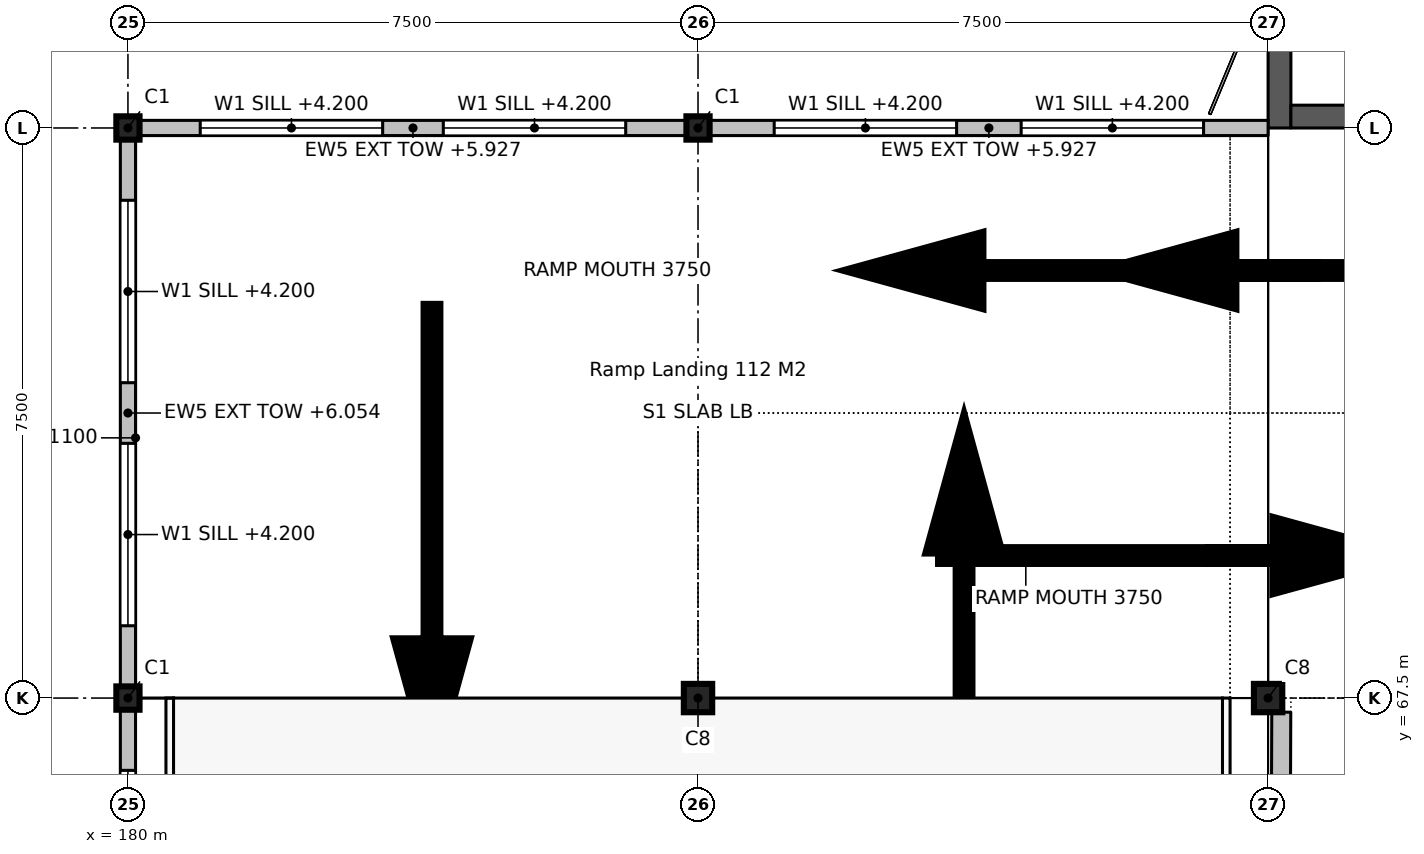
"""IFC4 building model, lengths in metres.
Left out: names, types, materials, properties, quantities, classifications, styles, units other than length and angle.
Written with IfcOpenShell. Run it as: python <this file> out.ifc"""

import sys

from ifc_helpers import new_model, si_unit, direction, frame, frame_2d, origin, origin_2d, place, context, subcontext, project, spatial, rectangle, i_section, extrude, element, fill, save


model = new_model("IFC4")
c1 = context("Model", 3, precision=1e-05, world=origin(), true_north=direction((0.0, 1.0)))
c2 = subcontext(c1, "Body", "Model", "MODEL_VIEW")
j1 = project(units=[si_unit("LENGTHUNIT", "METRE"), si_unit("PLANEANGLEUNIT", "RADIAN")], contexts=[c1])
p1 = place(None, origin())
s1 = spatial("IfcSite", under=j1, at=p1, CompositionType="ELEMENT")
p2 = place(p1, origin())
s2 = spatial("IfcBuilding", under=s1, at=p2, CompositionType="ELEMENT")
p3 = place(p2, frame((0.0, 0.0, 3.3)))
s3 = spatial("IfcBuildingStorey", under=s2, at=p3, CompositionType="ELEMENT", Elevation=3.3)
for number, where, z_axis, x_axis in (
    (1, (180.0, 67.5, 0.0), (0.0, 0.0, 1.0), (1.0, 0.0, 0.0)),
    (2, (180.0, 75.0, 0.0), (0.0, 0.0, 1.0), (1.0, 0.0, 0.0)),
):
    element("IfcColumn", number, at=place(p3, frame(where, z_axis=z_axis, x_axis=x_axis)), inside=s3, PredefinedType="COLUMN", context=c2, shape_type="SweptSolid", body=[
        extrude(i_section(OverallWidth=0.305, OverallDepth=0.307, WebThickness=0.01, FlangeThickness=0.015, FilletRadius=0.015, at=origin_2d()), origin(), (0.0, 0.0, 1.0), 3.3),
    ])
p4 = place(p3, frame((187.5, 67.5, 0.0), z_axis=(0.0, 0.0, 1.0), x_axis=(1.0, 0.0, 0.0)))
e3 = element("IfcColumn", 3, at=p4, inside=s3, PredefinedType="COLUMN", context=c2, shape_type="SweptSolid", body=[
    extrude(i_section(OverallWidth=0.373, OverallDepth=0.373, WebThickness=0.016, FlangeThickness=0.026, FilletRadius=0.015, at=origin_2d()), origin(), (0.0, 0.0, 1.0), 3.3),
])
p5 = place(p3, frame((187.5, 75.0, 0.0), z_axis=(0.0, 0.0, 1.0), x_axis=(1.0, 0.0, 0.0)))
e4 = element("IfcColumn", 4, at=p5, inside=s3, PredefinedType="COLUMN", context=c2, shape_type="SweptSolid", body=[
    extrude(i_section(OverallWidth=0.305, OverallDepth=0.307, WebThickness=0.01, FlangeThickness=0.015, FilletRadius=0.015, at=origin_2d()), origin(), (0.0, 0.0, 1.0), 3.3),
])
p6 = place(p3, frame((195.0, 67.5, 0.0), z_axis=(0.0, 0.0, 1.0), x_axis=(0.0, 1.0, 0.0)))
e5 = element("IfcColumn", 5, at=p6, inside=s3, PredefinedType="COLUMN", context=c2, shape_type="SweptSolid", body=[
    extrude(i_section(OverallWidth=0.373, OverallDepth=0.373, WebThickness=0.016, FlangeThickness=0.026, FilletRadius=0.015, at=origin_2d()), origin(), (0.0, 0.0, 1.0), 3.3),
])
p7 = place(p3, frame((195.173, 67.314, 0.0), z_axis=(0.0, 0.0, 1.0), x_axis=(-0.003612914829, -0.999993473402, 0.0)))
e6 = element("IfcWall", 6, at=p7, inside=s3, PredefinedType="SOLIDWALL", context=c2, shape_type="SweptSolid", body=[
    extrude(rectangle(XDim=7.163, YDim=0.25, at=frame_2d((3.582, 0.0))), origin(), (0.0, 0.0, 1.0), 1.1),
])
p8 = place(p3, frame((180.0, 60.154, 0.0), z_axis=(0.0, 0.0, 1.0), x_axis=(0.0, 1.0, 0.0)))
e7 = element("IfcWall", 7, at=p8, inside=s3, PredefinedType="SOLIDWALL", context=c2, shape_type="SweptSolid", body=[
    extrude(rectangle(XDim=7.193, YDim=0.2, at=frame_2d((3.596, 0.0))), origin(), (0.0, 0.0, 1.0), 2.71),
])
p9 = place(p8, frame((0.798, 0.0, 0.9)))
e8 = element("IfcOpeningElement", 8, at=p9, cuts=e7, PredefinedType="OPENING", context=c2, shape_type="SweptSolid", body=[
    extrude(rectangle(XDim=2.4, YDim=1.5, at=frame_2d((1.2, 0.75))), frame((0.0, 0.11, 0.0), z_axis=(0.0, -1.0, 0.0), x_axis=(1.0, 0.0, 0.0)), (0.0, 0.0, 1.0), 0.22),
])
p10 = place(p8, frame((3.995, 0.0, 0.9)))
e9 = element("IfcOpeningElement", 9, at=p10, cuts=e7, PredefinedType="OPENING", context=c2, shape_type="SweptSolid", body=[
    extrude(rectangle(XDim=2.4, YDim=1.5, at=frame_2d((1.2, 0.75))), frame((0.0, 0.11, 0.0), z_axis=(0.0, -1.0, 0.0), x_axis=(1.0, 0.0, 0.0)), (0.0, 0.0, 1.0), 0.22),
])
p11 = place(p3, frame((180.0, 67.654, 0.0), z_axis=(0.0, 0.0, 1.0), x_axis=(0.0, 1.0, 0.0)))
e10 = element("IfcWall", 10, at=p11, inside=s3, PredefinedType="SOLIDWALL", context=c2, shape_type="SweptSolid", body=[
    extrude(rectangle(XDim=7.193, YDim=0.2, at=frame_2d((3.596, 0.0))), origin(), (0.0, 0.0, 1.0), 2.754),
])
p12 = place(p11, frame((0.798, 0.0, 0.9)))
e11 = element("IfcOpeningElement", 11, at=p12, cuts=e10, PredefinedType="OPENING", context=c2, shape_type="SweptSolid", body=[
    extrude(rectangle(XDim=2.4, YDim=1.5, at=frame_2d((1.2, 0.75))), frame((0.0, 0.11, 0.0), z_axis=(0.0, -1.0, 0.0), x_axis=(1.0, 0.0, 0.0)), (0.0, 0.0, 1.0), 0.22),
])
p13 = place(p11, frame((3.995, 0.0, 0.9)))
e12 = element("IfcOpeningElement", 12, at=p13, cuts=e10, PredefinedType="OPENING", context=c2, shape_type="SweptSolid", body=[
    extrude(rectangle(XDim=2.4, YDim=1.5, at=frame_2d((1.2, 0.75))), frame((0.0, 0.11, 0.0), z_axis=(0.0, -1.0, 0.0), x_axis=(1.0, 0.0, 0.0)), (0.0, 0.0, 1.0), 0.22),
])
p14 = place(p3, frame((180.154, 75.0, 0.0), z_axis=(0.0, 0.0, 1.0), x_axis=(1.0, 0.0, 0.0)))
e13 = element("IfcWall", 13, at=p14, inside=s3, PredefinedType="SOLIDWALL", context=c2, shape_type="SweptSolid", body=[
    extrude(rectangle(XDim=7.193, YDim=0.2, at=frame_2d((3.596, 0.0))), origin(), (0.0, 0.0, 1.0), 2.627),
])
p15 = place(p14, frame((0.798, 0.0, 0.9)))
e14 = element("IfcOpeningElement", 14, at=p15, cuts=e13, PredefinedType="OPENING", context=c2, shape_type="SweptSolid", body=[
    extrude(rectangle(XDim=2.4, YDim=1.5, at=frame_2d((1.2, 0.75))), frame((0.0, 0.11, 0.0), z_axis=(0.0, -1.0, 0.0), x_axis=(1.0, 0.0, 0.0)), (0.0, 0.0, 1.0), 0.22),
])
p16 = place(p14, frame((3.995, 0.0, 0.9)))
e15 = element("IfcOpeningElement", 15, at=p16, cuts=e13, PredefinedType="OPENING", context=c2, shape_type="SweptSolid", body=[
    extrude(rectangle(XDim=2.4, YDim=1.5, at=frame_2d((1.2, 0.75))), frame((0.0, 0.11, 0.0), z_axis=(0.0, -1.0, 0.0), x_axis=(1.0, 0.0, 0.0)), (0.0, 0.0, 1.0), 0.22),
])
p17 = place(p3, frame((187.654, 75.0, 0.0), z_axis=(0.0, 0.0, 1.0), x_axis=(1.0, 0.0, 0.0)))
e16 = element("IfcWall", 16, at=p17, inside=s3, PredefinedType="SOLIDWALL", context=c2, shape_type="SweptSolid", body=[
    extrude(rectangle(XDim=7.346, YDim=0.2, at=frame_2d((3.673, 0.0))), origin(), (0.0, 0.0, 1.0), 2.627),
])
p18 = place(p17, frame((0.849, 0.0, 0.9)))
e17 = element("IfcOpeningElement", 17, at=p18, cuts=e16, PredefinedType="OPENING", context=c2, shape_type="SweptSolid", body=[
    extrude(rectangle(XDim=2.4, YDim=1.5, at=frame_2d((1.2, 0.75))), frame((0.0, 0.11, 0.0), z_axis=(0.0, -1.0, 0.0), x_axis=(1.0, 0.0, 0.0)), (0.0, 0.0, 1.0), 0.22),
])
p19 = place(p17, frame((4.098, 0.0, 0.9)))
e18 = element("IfcOpeningElement", 18, at=p19, cuts=e16, PredefinedType="OPENING", context=c2, shape_type="SweptSolid", body=[
    extrude(rectangle(XDim=2.4, YDim=1.5, at=frame_2d((1.2, 0.75))), frame((0.0, 0.11, 0.0), z_axis=(0.0, -1.0, 0.0), x_axis=(1.0, 0.0, 0.0)), (0.0, 0.0, 1.0), 0.22),
])
p20 = place(p3, frame((195.15, 75.0, 0.0), z_axis=(0.0, 0.0, 1.0), x_axis=(0.0, 1.0, 0.0)))
e19 = element("IfcWall", 19, at=p20, inside=s3, PredefinedType="SHEAR", context=c2, shape_type="SweptSolid", body=[
    extrude(rectangle(XDim=5.0, YDim=0.3, at=frame_2d((2.5, 0.0))), origin(), (0.0, 0.0, 1.0), 3.3),
])
p21 = place(p3, frame((202.2, 75.15, 0.0), z_axis=(0.0, 0.0, 1.0), x_axis=(-1.0, 0.0, 0.0)))
e20 = element("IfcWall", 20, at=p21, inside=s3, PredefinedType="SHEAR", context=c2, shape_type="SweptSolid", body=[
    extrude(rectangle(XDim=6.9, YDim=0.3, at=frame_2d((3.45, 0.0))), origin(), (0.0, 0.0, 1.0), 3.3),
])
p22 = place(p10, origin())
e21 = element("IfcWindow", 21, at=p22, inside=s3, PartitioningType="DOUBLE_PANEL_VERTICAL", PredefinedType="WINDOW", context=c2, shape_type="SweptSolid", body=[
    extrude(rectangle(XDim=2.4, YDim=1.5, at=frame_2d((1.2, 0.75))), frame((0.0, 0.03, 0.0), z_axis=(0.0, -1.0, 0.0), x_axis=(1.0, 0.0, 0.0)), (0.0, 0.0, 1.0), 0.06),
])
fill(e9, e21)
p23 = place(p12, origin())
e22 = element("IfcWindow", 22, at=p23, inside=s3, PartitioningType="DOUBLE_PANEL_VERTICAL", PredefinedType="WINDOW", context=c2, shape_type="SweptSolid", body=[
    extrude(rectangle(XDim=2.4, YDim=1.5, at=frame_2d((1.2, 0.75))), frame((0.0, 0.03, 0.0), z_axis=(0.0, -1.0, 0.0), x_axis=(1.0, 0.0, 0.0)), (0.0, 0.0, 1.0), 0.06),
])
fill(e11, e22)
p24 = place(p13, origin())
e23 = element("IfcWindow", 23, at=p24, inside=s3, PartitioningType="DOUBLE_PANEL_VERTICAL", PredefinedType="WINDOW", context=c2, shape_type="SweptSolid", body=[
    extrude(rectangle(XDim=2.4, YDim=1.5, at=frame_2d((1.2, 0.75))), frame((0.0, 0.03, 0.0), z_axis=(0.0, -1.0, 0.0), x_axis=(1.0, 0.0, 0.0)), (0.0, 0.0, 1.0), 0.06),
])
fill(e12, e23)
p25 = place(p15, origin())
e24 = element("IfcWindow", 24, at=p25, inside=s3, PartitioningType="DOUBLE_PANEL_VERTICAL", PredefinedType="WINDOW", context=c2, shape_type="SweptSolid", body=[
    extrude(rectangle(XDim=2.4, YDim=1.5, at=frame_2d((1.2, 0.75))), frame((0.0, 0.03, 0.0), z_axis=(0.0, -1.0, 0.0), x_axis=(1.0, 0.0, 0.0)), (0.0, 0.0, 1.0), 0.06),
])
fill(e14, e24)
p26 = place(p16, origin())
e25 = element("IfcWindow", 25, at=p26, inside=s3, PartitioningType="DOUBLE_PANEL_VERTICAL", PredefinedType="WINDOW", context=c2, shape_type="SweptSolid", body=[
    extrude(rectangle(XDim=2.4, YDim=1.5, at=frame_2d((1.2, 0.75))), frame((0.0, 0.03, 0.0), z_axis=(0.0, -1.0, 0.0), x_axis=(1.0, 0.0, 0.0)), (0.0, 0.0, 1.0), 0.06),
])
fill(e15, e25)
p27 = place(p18, origin())
e26 = element("IfcWindow", 26, at=p27, inside=s3, PartitioningType="DOUBLE_PANEL_VERTICAL", PredefinedType="WINDOW", context=c2, shape_type="SweptSolid", body=[
    extrude(rectangle(XDim=2.4, YDim=1.5, at=frame_2d((1.2, 0.75))), frame((0.0, 0.03, 0.0), z_axis=(0.0, -1.0, 0.0), x_axis=(1.0, 0.0, 0.0)), (0.0, 0.0, 1.0), 0.06),
])
fill(e17, e26)
p28 = place(p19, origin())
e27 = element("IfcWindow", 27, at=p28, inside=s3, PartitioningType="DOUBLE_PANEL_VERTICAL", PredefinedType="WINDOW", context=c2, shape_type="SweptSolid", body=[
    extrude(rectangle(XDim=2.4, YDim=1.5, at=frame_2d((1.2, 0.75))), frame((0.0, 0.03, 0.0), z_axis=(0.0, -1.0, 0.0), x_axis=(1.0, 0.0, 0.0)), (0.0, 0.0, 1.0), 0.06),
])
fill(e18, e27)
save(model, sys.argv[1])
